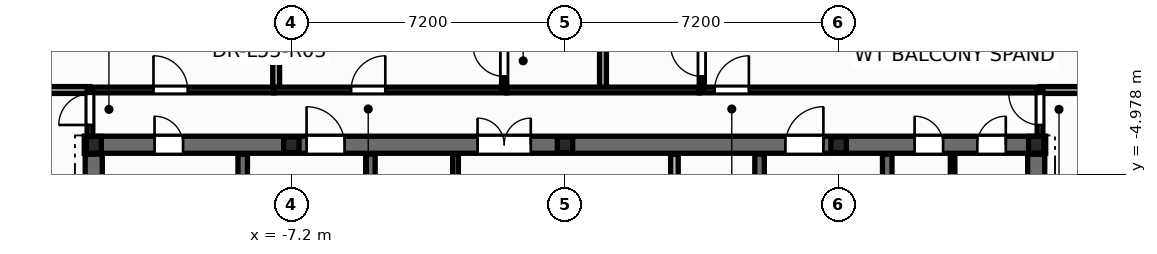
"""IFC4 building model, lengths in metres.
Left out: names, types, materials, properties, quantities, classifications, styles, units other than length and angle.
Written with IfcOpenShell. Run it as: python <this file> out.ifc"""

import sys

from ifc_helpers import new_model, si_unit, direction, frame, frame_2d, origin, origin_2d, place, context, subcontext, project, spatial, rectangle, i_section, extrude, element, fill, save


model = new_model("IFC4")
c1 = context("Model", 3, precision=1e-05, world=origin(), true_north=direction((0.0, 1.0)))
c2 = subcontext(c1, "Body", "Model", "MODEL_VIEW")
j1 = project(units=[si_unit("LENGTHUNIT", "METRE"), si_unit("PLANEANGLEUNIT", "RADIAN")], contexts=[c1])
p1 = place(None, origin())
s1 = spatial("IfcSite", under=j1, at=p1, CompositionType="ELEMENT")
p2 = place(p1, origin())
s2 = spatial("IfcBuilding", under=s1, at=p2, CompositionType="ELEMENT")
p3 = place(p2, frame((0.0, 0.0, 210.9)))
s3 = spatial("IfcBuildingStorey", under=s2, at=p3, CompositionType="ELEMENT", Elevation=210.9)
for number, where, z_axis, x_axis in (
    (1, (12.4, -4.2, 0.0), (0.0, 0.0, 1.0), (1.0, 0.0, 0.0)),
    (2, (-12.4, -4.2, 0.0), (0.0, 0.0, 1.0), (1.0, 0.0, 0.0)),
):
    element("IfcColumn", number, at=place(p3, frame(where, z_axis=z_axis, x_axis=x_axis)), inside=s3, PredefinedType="COLUMN", context=c2, shape_type="SweptSolid", body=[
        extrude(i_section(OverallWidth=0.4, OverallDepth=0.44, WebThickness=0.028, FlangeThickness=0.04, at=origin_2d()), origin(), (0.0, 0.0, 1.0), 3.6),
    ])
for number, where, z_axis, x_axis in (
    (3, (-7.2, -4.2, 0.0), (0.0, 0.0, 1.0), (1.0, 0.0, 0.0)),
    (4, (0.0, -4.2, 0.0), (0.0, 0.0, 1.0), (1.0, 0.0, 0.0)),
    (5, (7.2, -4.2, 0.0), (0.0, 0.0, 1.0), (1.0, 0.0, 0.0)),
):
    element("IfcColumn", number, at=place(p3, frame(where, z_axis=z_axis, x_axis=x_axis)), inside=s3, PredefinedType="PILASTER", context=c2, shape_type="SweptSolid", body=[
        extrude(i_section(OverallWidth=0.405, OverallDepth=0.414, WebThickness=0.022, FlangeThickness=0.032, at=origin_2d()), origin(), (0.0, 0.0, 1.0), 3.6),
    ])
p4 = place(p3, frame((-12.032, 1.541, -0.2), z_axis=(0.0, 0.0, 1.0), x_axis=(-0.583546701141, -0.812079582053, 0.0)))
e6 = element("IfcWall", 6, at=p4, inside=s3, PredefinedType="PARAPET", context=c2, shape_type="SweptSolid", body=[
    extrude(rectangle(XDim=15.541, YDim=0.36, at=frame_2d((7.77, 0.0))), origin(), (0.0, 0.0, 1.0), 0.38),
])
p5 = place(p3, frame((-2.88, -5.6, 0.0), z_axis=(0.0, 0.0, 1.0), x_axis=(0.0, 1.0, 0.0)))
e7 = element("IfcWall", 7, at=p5, inside=s3, PredefinedType="PARTITIONING", context=c2, shape_type="SweptSolid", body=[
    extrude(rectangle(XDim=1.15, YDim=0.15, at=frame_2d((0.575, 0.0))), origin(), (0.0, 0.0, 1.0), 3.345),
])
p6 = place(p3, frame((10.2, -5.52, 0.0), z_axis=(0.0, 0.0, 1.0), x_axis=(0.0, 1.0, 0.0)))
e8 = element("IfcWall", 8, at=p6, inside=s3, PredefinedType="PARTITIONING", context=c2, shape_type="SweptSolid", body=[
    extrude(rectangle(XDim=1.12, YDim=0.12, at=frame_2d((0.56, 0.0))), origin(), (0.0, 0.0, 1.0), 3.345),
])
p7 = place(p3, frame((-12.65, -4.2, 0.0), z_axis=(0.0, 0.0, 1.0), x_axis=(1.0, 0.0, 0.0)))
e9 = element("IfcWall", 9, at=p7, inside=s3, PredefinedType="SHEAR", context=c2, shape_type="SweptSolid", body=[
    extrude(rectangle(XDim=25.3, YDim=0.45, at=frame_2d((12.65, 0.0))), origin(), (0.0, 0.0, 1.0), 3.6),
])
p8 = place(p7, frame((1.85, 0.0, 0.0)))
e10 = element("IfcOpeningElement", 10, at=p8, cuts=e9, PredefinedType="OPENING", context=c2, shape_type="SweptSolid", body=[
    extrude(rectangle(XDim=0.756, YDim=2.054, at=frame_2d((0.375, 1.027))), frame((0.0, 0.235, 0.0), z_axis=(0.0, -1.0, 0.0), x_axis=(1.0, 0.0, 0.0)), (0.0, 0.0, 1.0), 0.47),
])
p9 = place(p7, frame((21.85, 0.0, 0.0)))
e11 = element("IfcOpeningElement", 11, at=p9, cuts=e9, PredefinedType="OPENING", context=c2, shape_type="SweptSolid", body=[
    extrude(rectangle(XDim=0.756, YDim=2.054, at=frame_2d((0.375, 1.027))), frame((0.0, 0.235, 0.0), z_axis=(0.0, -1.0, 0.0), x_axis=(1.0, 0.0, 0.0)), (0.0, 0.0, 1.0), 0.47),
])
p10 = place(p7, frame((23.5, 0.0, 0.0)))
e12 = element("IfcOpeningElement", 12, at=p10, cuts=e9, PredefinedType="OPENING", context=c2, shape_type="SweptSolid", body=[
    extrude(rectangle(XDim=0.756, YDim=2.054, at=frame_2d((0.375, 1.027))), frame((0.0, 0.235, 0.0), z_axis=(0.0, -1.0, 0.0), x_axis=(1.0, 0.0, 0.0)), (0.0, 0.0, 1.0), 0.47),
])
p11 = place(p7, frame((5.85, 0.0, 0.0)))
e13 = element("IfcOpeningElement", 13, at=p11, cuts=e9, PredefinedType="OPENING", context=c2, shape_type="SweptSolid", body=[
    extrude(rectangle(XDim=1.006, YDim=2.104, at=frame_2d((0.5, 1.052))), frame((0.0, 0.235, 0.0), z_axis=(0.0, -1.0, 0.0), x_axis=(1.0, 0.0, 0.0)), (0.0, 0.0, 1.0), 0.47),
])
p12 = place(p7, frame((10.35, 0.0, 0.0)))
e14 = element("IfcOpeningElement", 14, at=p12, cuts=e9, PredefinedType="OPENING", context=c2, shape_type="SweptSolid", body=[
    extrude(rectangle(XDim=1.406, YDim=2.154, at=frame_2d((0.7, 1.077))), frame((0.0, 0.235, 0.0), z_axis=(0.0, -1.0, 0.0), x_axis=(1.0, 0.0, 0.0)), (0.0, 0.0, 1.0), 0.47),
])
p13 = place(p7, frame((18.45, 0.0, 0.0)))
e15 = element("IfcOpeningElement", 15, at=p13, cuts=e9, PredefinedType="OPENING", context=c2, shape_type="SweptSolid", body=[
    extrude(rectangle(XDim=1.006, YDim=2.104, at=frame_2d((0.5, 1.052))), frame((0.0, 0.235, 0.0), z_axis=(0.0, -1.0, 0.0), x_axis=(1.0, 0.0, 0.0)), (0.0, 0.0, 1.0), 0.47),
])
p14 = place(p3, frame((-8.48, -13.85, 0.0), z_axis=(0.0, 0.0, 1.0), x_axis=(0.0, 1.0, 0.0)))
e16 = element("IfcWall", 16, at=p14, inside=s3, PredefinedType="SHEAR", context=c2, shape_type="SweptSolid", body=[
    extrude(rectangle(XDim=9.4, YDim=0.25, at=frame_2d((4.7, 0.0))), origin(), (0.0, 0.0, 1.0), 3.6),
])
p15 = place(p14, frame((6.95, 0.0, 0.0)))
e17 = element("IfcOpeningElement", 17, at=p15, cuts=e16, PredefinedType="OPENING", context=c2, shape_type="SweptSolid", body=[
    extrude(rectangle(XDim=1.006, YDim=2.104, at=frame_2d((0.5, 1.052))), frame((0.0, 0.135, 0.0), z_axis=(0.0, -1.0, 0.0), x_axis=(1.0, 0.0, 0.0)), (0.0, 0.0, 1.0), 0.27),
])
p16 = place(p3, frame((8.48, -13.85, 0.0), z_axis=(0.0, 0.0, 1.0), x_axis=(0.0, 1.0, 0.0)))
e18 = element("IfcWall", 18, at=p16, inside=s3, PredefinedType="SHEAR", context=c2, shape_type="SweptSolid", body=[
    extrude(rectangle(XDim=9.4, YDim=0.25, at=frame_2d((4.7, 0.0))), origin(), (0.0, 0.0, 1.0), 3.6),
])
p17 = place(p16, frame((6.95, 0.0, 0.0)))
e19 = element("IfcOpeningElement", 19, at=p17, cuts=e18, PredefinedType="OPENING", context=c2, shape_type="SweptSolid", body=[
    extrude(rectangle(XDim=1.006, YDim=2.104, at=frame_2d((0.5, 1.052))), frame((0.0, 0.135, 0.0), z_axis=(0.0, -1.0, 0.0), x_axis=(1.0, 0.0, 0.0)), (0.0, 0.0, 1.0), 0.27),
])
for number, where, z_axis, x_axis in (
    (20, (-5.12, -13.85, 0.0), (0.0, 0.0, 1.0), (0.0, 1.0, 0.0)),
    (21, (5.12, -13.85, 0.0), (0.0, 0.0, 1.0), (0.0, 1.0, 0.0)),
):
    element("IfcWall", number, at=place(p3, frame(where, z_axis=z_axis, x_axis=x_axis)), inside=s3, PredefinedType="SHEAR", context=c2, shape_type="SweptSolid", body=[
        extrude(rectangle(XDim=9.4, YDim=0.25, at=frame_2d((4.7, 0.0))), origin(), (0.0, 0.0, 1.0), 3.6),
    ])
for number, where, z_axis, x_axis in (
    (22, (-12.4, -13.85, 0.0), (0.0, 0.0, 1.0), (0.0, 1.0, 0.0)),
    (23, (12.4, -13.85, 0.0), (0.0, 0.0, 1.0), (0.0, 1.0, 0.0)),
):
    element("IfcWall", number, at=place(p3, frame(where, z_axis=z_axis, x_axis=x_axis)), inside=s3, PredefinedType="SHEAR", context=c2, shape_type="SweptSolid", body=[
        extrude(rectangle(XDim=9.4, YDim=0.45, at=frame_2d((4.7, 0.0))), origin(), (0.0, 0.0, 1.0), 3.6),
    ])
p18 = place(p3, frame((2.88, -9.45, 0.0), z_axis=(0.0, 0.0, 1.0), x_axis=(0.0, 1.0, 0.0)))
e24 = element("IfcWall", 24, at=p18, inside=s3, PredefinedType="SOLIDWALL", context=c2, shape_type="SweptSolid", body=[
    extrude(rectangle(XDim=5.0, YDim=0.2, at=frame_2d((2.5, 0.0))), origin(), (0.0, 0.0, 1.0), 3.345),
])
p19 = place(p18, frame((2.05, 0.0, 0.0)))
e25 = element("IfcOpeningElement", 25, at=p19, cuts=e24, PredefinedType="OPENING", context=c2, shape_type="SweptSolid", body=[
    extrude(rectangle(XDim=0.926, YDim=2.104, at=frame_2d((0.46, 1.052))), frame((0.0, 0.11, 0.0), z_axis=(0.0, -1.0, 0.0), x_axis=(1.0, 0.0, 0.0)), (0.0, 0.0, 1.0), 0.22),
])
p20 = place(p3, frame((3.54, -2.76, 0.0), z_axis=(0.0, 0.0, 1.0), x_axis=(1.0, 0.0, 0.0)))
e26 = element("IfcWall", 26, at=p20, inside=s3, PredefinedType="PARTITIONING", context=c2, shape_type="SweptSolid", body=[
    extrude(rectangle(XDim=8.96, YDim=0.15, at=frame_2d((4.48, 0.0))), origin(), (0.0, 0.0, 1.0), 2.32),
])
p21 = place(p20, frame((0.399, 0.0, 0.0)))
e27 = element("IfcOpeningElement", 27, at=p21, cuts=e26, PredefinedType="OPENING", context=c2, shape_type="SweptSolid", body=[
    extrude(rectangle(XDim=0.906, YDim=2.104, at=frame_2d((0.45, 1.052))), frame((0.0, 0.085, 0.0), z_axis=(0.0, -1.0, 0.0), x_axis=(1.0, 0.0, 0.0)), (0.0, 0.0, 1.0), 0.17),
])
p22 = place(p3, frame((-7.6, -2.76, 0.0), z_axis=(0.0, 0.0, 1.0), x_axis=(0.0, 1.0, 0.0)))
e28 = element("IfcWall", 28, at=p22, inside=s3, PredefinedType="PARTITIONING", context=c2, shape_type="SweptSolid", body=[
    extrude(rectangle(XDim=10.195, YDim=0.18, at=frame_2d((5.098, 0.0))), origin(), (0.0, 0.0, 1.0), 2.62),
])
p23 = place(p3, frame((-7.66, -2.76, 0.0), z_axis=(0.0, 0.0, 1.0), x_axis=(1.0, 0.0, 0.0)))
e29 = element("IfcWall", 29, at=p23, inside=s3, PredefinedType="PARTITIONING", context=c2, shape_type="SweptSolid", body=[
    extrude(rectangle(XDim=6.12, YDim=0.15, at=frame_2d((3.06, 0.0))), origin(), (0.0, 0.0, 1.0), 2.32),
])
p24 = place(p23, frame((2.032, 0.0, 0.0)))
e30 = element("IfcOpeningElement", 30, at=p24, cuts=e29, PredefinedType="OPENING", context=c2, shape_type="SweptSolid", body=[
    extrude(rectangle(XDim=0.906, YDim=2.104, at=frame_2d((0.45, 1.052))), frame((0.0, 0.085, 0.0), z_axis=(0.0, -1.0, 0.0), x_axis=(1.0, 0.0, 0.0)), (0.0, 0.0, 1.0), 0.17),
])
p25 = place(p3, frame((-12.5, -2.76, 0.0), z_axis=(0.0, 0.0, 1.0), x_axis=(1.0, 0.0, 0.0)))
e31 = element("IfcWall", 31, at=p25, inside=s3, PredefinedType="PARTITIONING", context=c2, shape_type="SweptSolid", body=[
    extrude(rectangle(XDim=4.838, YDim=0.15, at=frame_2d((2.419, 0.0))), origin(), (0.0, 0.0, 1.0), 3.345),
])
p26 = place(p25, frame((1.672, 0.0, 0.0)))
e32 = element("IfcOpeningElement", 32, at=p26, cuts=e31, PredefinedType="OPENING", context=c2, shape_type="SweptSolid", body=[
    extrude(rectangle(XDim=0.906, YDim=2.104, at=frame_2d((0.45, 1.052))), frame((0.0, 0.085, 0.0), z_axis=(0.0, -1.0, 0.0), x_axis=(1.0, 0.0, 0.0)), (0.0, 0.0, 1.0), 0.17),
])
p27 = place(p3, frame((1.0, -2.76, 0.0), z_axis=(0.0, 0.0, 1.0), x_axis=(0.0, 1.0, 0.0)))
e33 = element("IfcWall", 33, at=p27, inside=s3, PredefinedType="PARTITIONING", context=c2, shape_type="SweptSolid", body=[
    extrude(rectangle(XDim=16.11, YDim=0.18, at=frame_2d((8.055, 0.0))), origin(), (0.0, 0.0, 1.0), 2.32),
])
p28 = place(p3, frame((-1.6, -2.76, 0.0), z_axis=(0.0, 0.0, 1.0), x_axis=(0.0, 1.0, 0.0)))
e34 = element("IfcWall", 34, at=p28, inside=s3, PredefinedType="PARTITIONING", context=c2, shape_type="SweptSolid", body=[
    extrude(rectangle(XDim=2.92, YDim=0.135, at=frame_2d((1.46, 0.0))), origin(), (0.0, 0.0, 1.0), 3.345),
])
p29 = place(p28, frame((0.357, 0.0, 0.0)))
e35 = element("IfcOpeningElement", 35, at=p29, cuts=e34, PredefinedType="OPENING", context=c2, shape_type="SweptSolid", body=[
    extrude(rectangle(XDim=0.826, YDim=2.104, at=frame_2d((0.41, 1.052))), frame((0.0, 0.078, 0.0), z_axis=(0.0, -1.0, 0.0), x_axis=(1.0, 0.0, 0.0)), (0.0, 0.0, 1.0), 0.155),
])
p30 = place(p3, frame((3.6, -2.76, 0.0), z_axis=(0.0, 0.0, 1.0), x_axis=(0.0, 1.0, 0.0)))
e36 = element("IfcWall", 36, at=p30, inside=s3, PredefinedType="PARTITIONING", context=c2, shape_type="SweptSolid", body=[
    extrude(rectangle(XDim=2.92, YDim=0.135, at=frame_2d((1.46, 0.0))), origin(), (0.0, 0.0, 1.0), 2.965),
])
p31 = place(p30, frame((0.357, 0.0, 0.0)))
e37 = element("IfcOpeningElement", 37, at=p31, cuts=e36, PredefinedType="OPENING", context=c2, shape_type="SweptSolid", body=[
    extrude(rectangle(XDim=0.826, YDim=2.104, at=frame_2d((0.41, 1.052))), frame((0.0, 0.078, 0.0), z_axis=(0.0, -1.0, 0.0), x_axis=(1.0, 0.0, 0.0)), (0.0, 0.0, 1.0), 0.155),
])
p32 = place(p3, frame((-1.538, -2.76, 0.0), z_axis=(0.0, 0.0, 1.0), x_axis=(1.0, 0.0, 0.0)))
e38 = element("IfcWall", 38, at=p32, inside=s3, PredefinedType="PARTITIONING", context=c2, shape_type="SweptSolid", body=[
    extrude(rectangle(XDim=5.076, YDim=0.15, at=frame_2d((2.538, 0.0))), origin(), (0.0, 0.0, 1.0), 2.32),
])
for number, where, z_axis, x_axis in (
    (39, (-14.926, -2.76, 0.0), (0.0, 0.0, 1.0), (1.0, 0.0, 0.0)),
    (40, (12.5, -2.76, 0.0), (0.0, 0.0, 1.0), (1.0, 0.0, 0.0)),
):
    element("IfcWall", number, at=place(p3, frame(where, z_axis=z_axis, x_axis=x_axis)), inside=s3, PredefinedType="PARTITIONING", context=c2, shape_type="SweptSolid", body=[
        extrude(rectangle(XDim=2.426, YDim=0.18, at=frame_2d((1.213, 0.0))), origin(), (0.0, 0.0, 1.0), 2.62),
    ])
p33 = place(p3, frame((-12.5, -4.24, 0.0), z_axis=(0.0, 0.0, 1.0), x_axis=(0.0, 1.0, 0.0)))
e41 = element("IfcWall", 41, at=p33, inside=s3, PredefinedType="PARTITIONING", context=c2, shape_type="SweptSolid", body=[
    extrude(rectangle(XDim=1.48, YDim=0.15, at=frame_2d((0.74, 0.0))), origin(), (0.0, 0.0, 1.0), 2.32),
])
p34 = place(p33, frame((0.56, 0.0, 0.0)))
e42 = element("IfcOpeningElement", 42, at=p34, cuts=e41, PredefinedType="OPENING", context=c2, shape_type="SweptSolid", body=[
    extrude(rectangle(XDim=0.826, YDim=2.104, at=frame_2d((0.41, 1.052))), frame((0.0, 0.085, 0.0), z_axis=(0.0, -1.0, 0.0), x_axis=(1.0, 0.0, 0.0)), (0.0, 0.0, 1.0), 0.17),
])
p35 = place(p3, frame((12.5, -4.24, 0.0), z_axis=(0.0, 0.0, 1.0), x_axis=(0.0, 1.0, 0.0)))
e43 = element("IfcWall", 43, at=p35, inside=s3, PredefinedType="PARTITIONING", context=c2, shape_type="SweptSolid", body=[
    extrude(rectangle(XDim=1.48, YDim=0.15, at=frame_2d((0.74, 0.0))), origin(), (0.0, 0.0, 1.0), 2.32),
])
p36 = place(p35, frame((0.56, 0.0, 0.0)))
e44 = element("IfcOpeningElement", 44, at=p36, cuts=e43, PredefinedType="OPENING", context=c2, shape_type="SweptSolid", body=[
    extrude(rectangle(XDim=0.826, YDim=2.104, at=frame_2d((0.41, 1.052))), frame((0.0, 0.085, 0.0), z_axis=(0.0, -1.0, 0.0), x_axis=(1.0, 0.0, 0.0)), (0.0, 0.0, 1.0), 0.17),
])
p37 = place(p8, origin())
e45 = element("IfcDoor", 45, at=p37, inside=s3, OperationType="SINGLE_SWING_LEFT", PredefinedType="DOOR", context=c2, shape_type="SweptSolid", body=[
    extrude(rectangle(XDim=0.75, YDim=2.05, at=frame_2d((0.375, 1.025))), frame((0.0, 0.025, 0.0), z_axis=(0.0, -1.0, 0.0), x_axis=(1.0, 0.0, 0.0)), (0.0, 0.0, 1.0), 0.05),
])
fill(e10, e45)
p38 = place(p9, origin())
e46 = element("IfcDoor", 46, at=p38, inside=s3, OperationType="SINGLE_SWING_LEFT", PredefinedType="DOOR", context=c2, shape_type="SweptSolid", body=[
    extrude(rectangle(XDim=0.75, YDim=2.05, at=frame_2d((0.375, 1.025))), frame((0.0, 0.025, 0.0), z_axis=(0.0, -1.0, 0.0), x_axis=(1.0, 0.0, 0.0)), (0.0, 0.0, 1.0), 0.05),
])
fill(e11, e46)
p39 = place(p10, origin())
e47 = element("IfcDoor", 47, at=p39, inside=s3, OperationType="SINGLE_SWING_RIGHT", PredefinedType="DOOR", context=c2, shape_type="SweptSolid", body=[
    extrude(rectangle(XDim=0.75, YDim=2.05, at=frame_2d((0.375, 1.025))), frame((0.0, 0.025, 0.0), z_axis=(0.0, -1.0, 0.0), x_axis=(1.0, 0.0, 0.0)), (0.0, 0.0, 1.0), 0.05),
])
fill(e12, e47)
p40 = place(p11, origin())
e48 = element("IfcDoor", 48, at=p40, inside=s3, OperationType="SINGLE_SWING_LEFT", PredefinedType="DOOR", context=c2, shape_type="SweptSolid", body=[
    extrude(rectangle(XDim=1.0, YDim=2.1, at=frame_2d((0.5, 1.05))), frame((0.0, 0.025, 0.0), z_axis=(0.0, -1.0, 0.0), x_axis=(1.0, 0.0, 0.0)), (0.0, 0.0, 1.0), 0.05),
])
fill(e13, e48)
p41 = place(p12, origin())
e49 = element("IfcDoor", 49, at=p41, inside=s3, OperationType="DOUBLE_DOOR_SINGLE_SWING", PredefinedType="DOOR", context=c2, shape_type="SweptSolid", body=[
    extrude(rectangle(XDim=1.4, YDim=2.15, at=frame_2d((0.7, 1.075))), frame((0.0, 0.025, 0.0), z_axis=(0.0, -1.0, 0.0), x_axis=(1.0, 0.0, 0.0)), (0.0, 0.0, 1.0), 0.05),
])
fill(e14, e49)
p42 = place(p13, origin())
e50 = element("IfcDoor", 50, at=p42, inside=s3, OperationType="SINGLE_SWING_RIGHT", PredefinedType="DOOR", context=c2, shape_type="SweptSolid", body=[
    extrude(rectangle(XDim=1.0, YDim=2.1, at=frame_2d((0.5, 1.05))), frame((0.0, 0.025, 0.0), z_axis=(0.0, -1.0, 0.0), x_axis=(1.0, 0.0, 0.0)), (0.0, 0.0, 1.0), 0.05),
])
fill(e15, e50)
p43 = place(p34, origin())
e51 = element("IfcDoor", 51, at=p43, inside=s3, OperationType="SINGLE_SWING_LEFT", PredefinedType="DOOR", context=c2, shape_type="SweptSolid", body=[
    extrude(rectangle(XDim=0.82, YDim=2.1, at=frame_2d((0.41, 1.05))), frame((0.0, 0.025, 0.0), z_axis=(0.0, -1.0, 0.0), x_axis=(1.0, 0.0, 0.0)), (0.0, 0.0, 1.0), 0.05),
])
fill(e42, e51)
p44 = place(p36, origin())
e52 = element("IfcDoor", 52, at=p44, inside=s3, OperationType="SINGLE_SWING_RIGHT", PredefinedType="DOOR", context=c2, shape_type="SweptSolid", body=[
    extrude(rectangle(XDim=0.82, YDim=2.1, at=frame_2d((0.41, 1.05))), frame((0.0, 0.025, 0.0), z_axis=(0.0, -1.0, 0.0), x_axis=(1.0, 0.0, 0.0)), (0.0, 0.0, 1.0), 0.05),
])
fill(e44, e52)
p45 = place(p26, origin())
e53 = element("IfcDoor", 53, at=p45, inside=s3, OperationType="SINGLE_SWING_LEFT", PredefinedType="DOOR", context=c2, shape_type="SweptSolid", body=[
    extrude(rectangle(XDim=0.9, YDim=2.1, at=frame_2d((0.45, 1.05))), frame((0.0, 0.025, 0.0), z_axis=(0.0, -1.0, 0.0), x_axis=(1.0, 0.0, 0.0)), (0.0, 0.0, 1.0), 0.05),
])
fill(e32, e53)
p46 = place(p29, origin())
e54 = element("IfcDoor", 54, at=p46, inside=s3, OperationType="SINGLE_SWING_RIGHT", PredefinedType="DOOR", context=c2, shape_type="SweptSolid", body=[
    extrude(rectangle(XDim=0.82, YDim=2.1, at=frame_2d((0.41, 1.05))), frame((0.0, 0.025, 0.0), z_axis=(0.0, -1.0, 0.0), x_axis=(1.0, 0.0, 0.0)), (0.0, 0.0, 1.0), 0.05),
])
fill(e35, e54)
p47 = place(p24, origin())
e55 = element("IfcDoor", 55, at=p47, inside=s3, OperationType="SINGLE_SWING_RIGHT", PredefinedType="DOOR", context=c2, shape_type="SweptSolid", body=[
    extrude(rectangle(XDim=0.9, YDim=2.1, at=frame_2d((0.45, 1.05))), frame((0.0, 0.025, 0.0), z_axis=(0.0, -1.0, 0.0), x_axis=(1.0, 0.0, 0.0)), (0.0, 0.0, 1.0), 0.05),
])
fill(e30, e55)
p48 = place(p31, origin())
e56 = element("IfcDoor", 56, at=p48, inside=s3, OperationType="SINGLE_SWING_RIGHT", PredefinedType="DOOR", context=c2, shape_type="SweptSolid", body=[
    extrude(rectangle(XDim=0.82, YDim=2.1, at=frame_2d((0.41, 1.05))), frame((0.0, 0.025, 0.0), z_axis=(0.0, -1.0, 0.0), x_axis=(1.0, 0.0, 0.0)), (0.0, 0.0, 1.0), 0.05),
])
fill(e37, e56)
p49 = place(p21, origin())
e57 = element("IfcDoor", 57, at=p49, inside=s3, OperationType="SINGLE_SWING_RIGHT", PredefinedType="DOOR", context=c2, shape_type="SweptSolid", body=[
    extrude(rectangle(XDim=0.9, YDim=2.1, at=frame_2d((0.45, 1.05))), frame((0.0, 0.025, 0.0), z_axis=(0.0, -1.0, 0.0), x_axis=(1.0, 0.0, 0.0)), (0.0, 0.0, 1.0), 0.05),
])
fill(e27, e57)
save(model, sys.argv[1])
